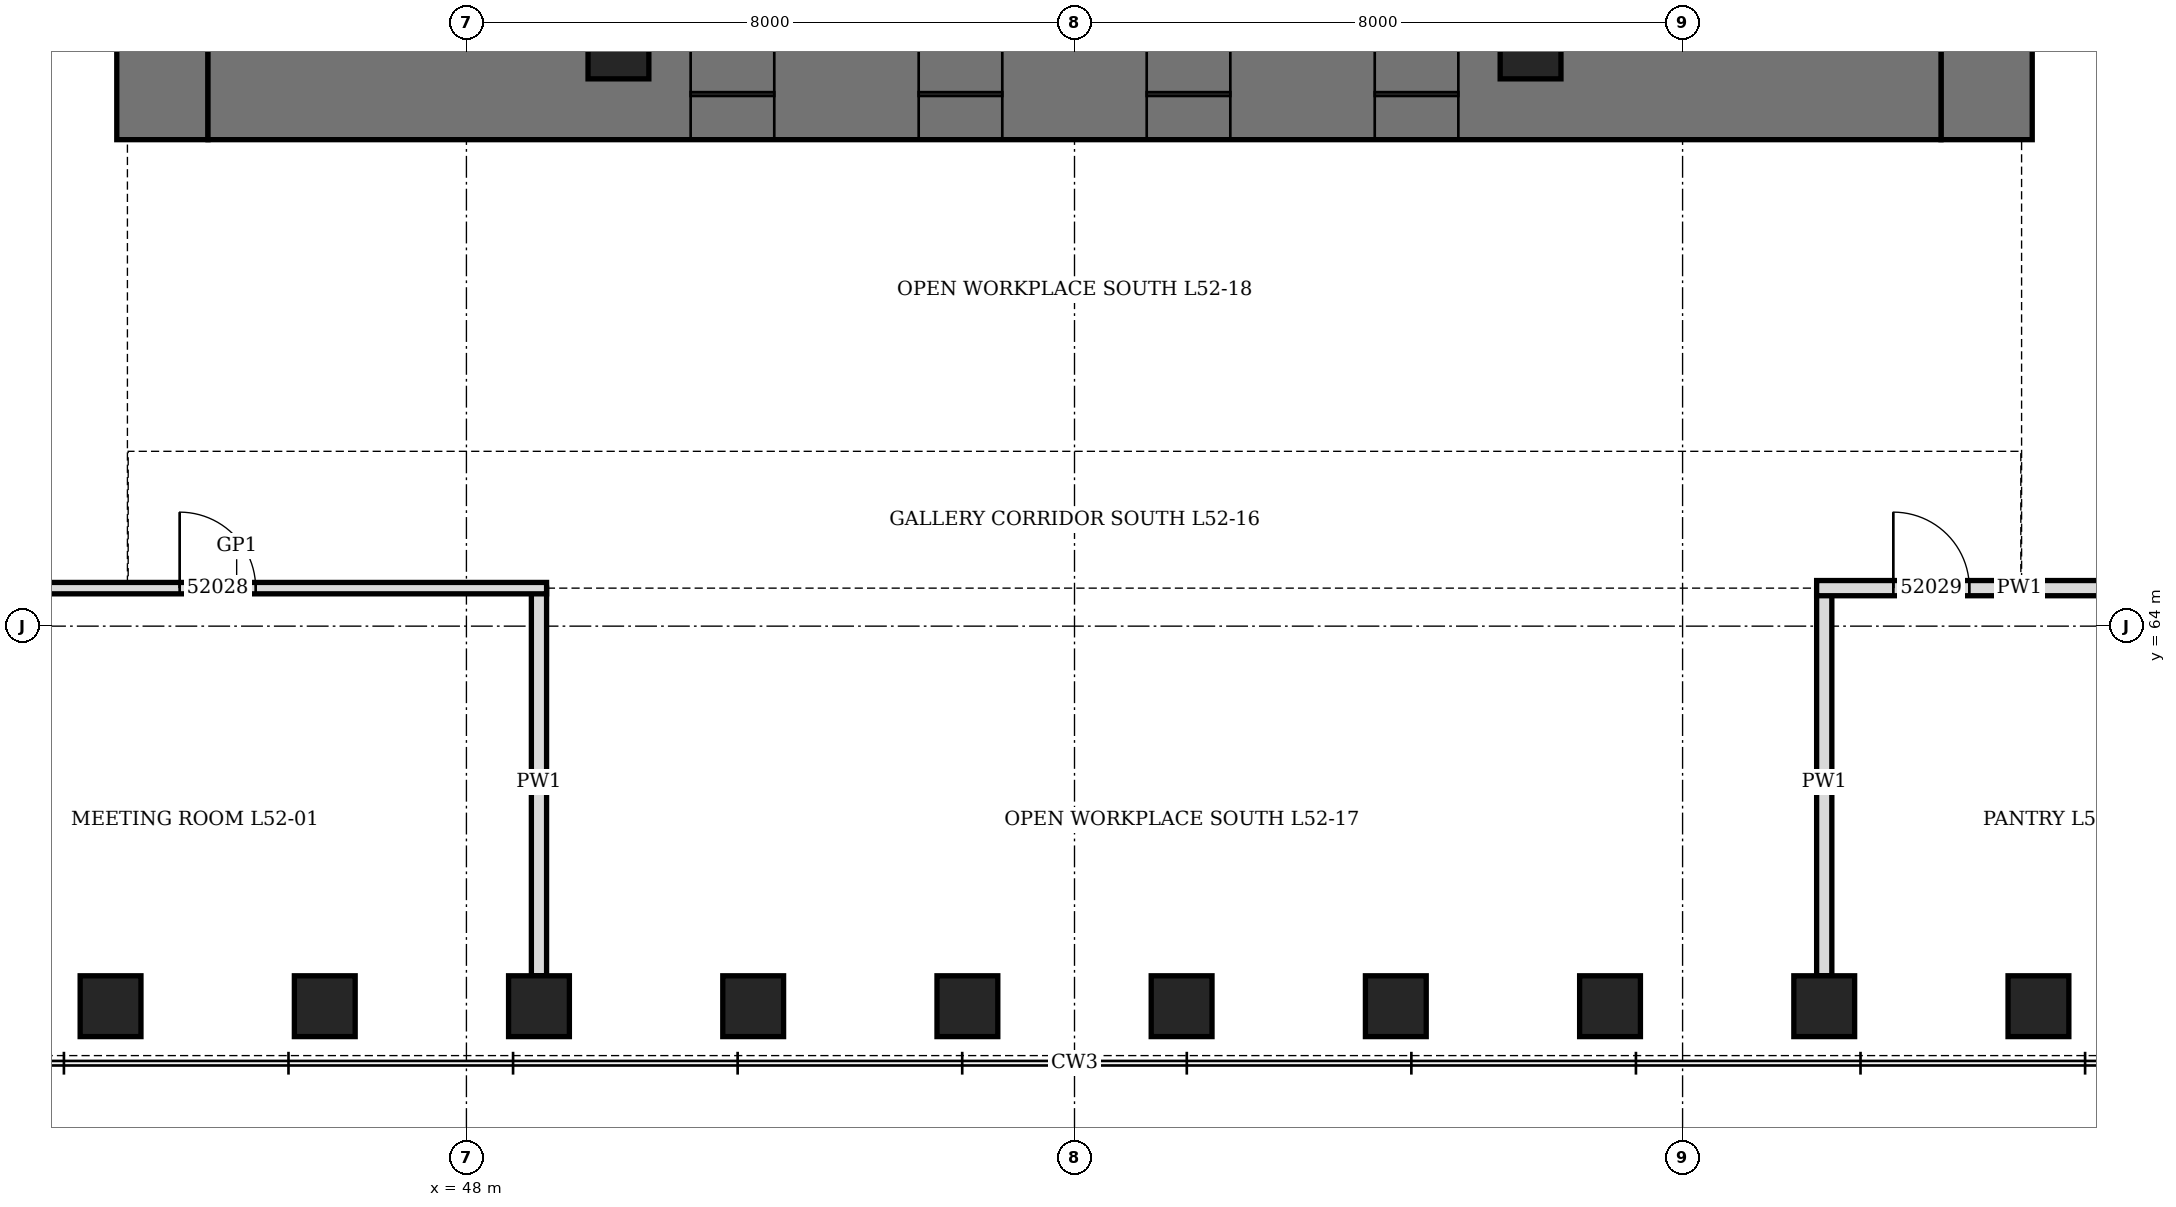
"""IFC4 building model, lengths in metres.
Left out: names, types, materials, properties, quantities, classifications, styles, units other than length and angle.
Written with IfcOpenShell. Run it as: python <this file> out.ifc"""

import sys

from ifc_helpers import new_model, si_unit, direction, frame, frame_2d, origin, origin_2d, place, context, subcontext, project, spatial, rectangle, hollow_rectangle, extrude, element, fill, save


model = new_model("IFC4")
c1 = context("Model", 3, precision=1e-05, world=origin(), true_north=direction((0.0, 1.0)))
c2 = subcontext(c1, "Body", "Model", "MODEL_VIEW")
j1 = project(units=[si_unit("LENGTHUNIT", "METRE"), si_unit("PLANEANGLEUNIT", "RADIAN")], contexts=[c1])
p1 = place(None, origin())
s1 = spatial("IfcSite", under=j1, at=p1, CompositionType="ELEMENT")
p2 = place(p1, origin())
s2 = spatial("IfcBuilding", under=s1, at=p2, CompositionType="ELEMENT")
p3 = place(p2, frame((0.0, 0.0, 231.7)))
s3 = spatial("IfcBuildingStorey", under=s2, at=p3, CompositionType="ELEMENT", Elevation=231.7)
for number, where, z_axis, x_axis in (
    (1, (43.318, 59.0, 0.0), (0.0, 0.0, 1.0), (1.0, 0.0, 0.0)),
    (2, (46.136, 59.0, 0.0), (0.0, 0.0, 1.0), (1.0, 0.0, 0.0)),
    (3, (48.955, 59.0, 0.0), (0.0, 0.0, 1.0), (1.0, 0.0, 0.0)),
    (4, (51.773, 59.0, 0.0), (0.0, 0.0, 1.0), (1.0, 0.0, 0.0)),
    (5, (54.591, 59.0, 0.0), (0.0, 0.0, 1.0), (1.0, 0.0, 0.0)),
    (6, (57.409, 59.0, 0.0), (0.0, 0.0, 1.0), (1.0, 0.0, 0.0)),
    (7, (60.227, 59.0, 0.0), (0.0, 0.0, 1.0), (1.0, 0.0, 0.0)),
    (8, (63.045, 59.0, 0.0), (0.0, 0.0, 1.0), (1.0, 0.0, 0.0)),
    (9, (65.864, 59.0, 0.0), (0.0, 0.0, 1.0), (1.0, 0.0, 0.0)),
    (10, (68.682, 59.0, 0.0), (0.0, 0.0, 1.0), (1.0, 0.0, 0.0)),
):
    element("IfcColumn", number, at=place(p3, frame(where, z_axis=z_axis, x_axis=x_axis)), inside=s3, PredefinedType="COLUMN", context=c2, shape_type="SweptSolid", body=[
        extrude(hollow_rectangle(XDim=0.8, YDim=0.8, WallThickness=0.08, at=origin_2d()), origin(), (0.0, 0.0, 1.0), 4.2),
    ])
p4 = place(p3, frame((44.0, 70.4, 0.0), z_axis=(0.0, 0.0, 1.0), x_axis=(0.0, 1.0, 0.0)))
e11 = element("IfcWall", 11, at=p4, inside=s3, PredefinedType="SHEAR", context=c2, shape_type="SweptSolid", body=[
    extrude(rectangle(XDim=19.2, YDim=1.2, at=frame_2d((9.6, 0.0))), origin(), (0.0, 0.0, 1.0), 4.2),
])
p5 = place(p4, frame((8.6, 0.0, 0.0)))
e12 = element("IfcOpeningElement", 12, at=p5, cuts=e11, PredefinedType="OPENING", context=c2, shape_type="SweptSolid", body=[
    extrude(rectangle(XDim=2.0, YDim=2.4, at=frame_2d((1.0, 1.2))), frame((0.0, 0.61, 0.0), z_axis=(0.0, -1.0, 0.0), x_axis=(1.0, 0.0, 0.0)), (0.0, 0.0, 1.0), 1.22),
])
p6 = place(p3, frame((68.0, 70.4, 0.0), z_axis=(0.0, 0.0, 1.0), x_axis=(0.0, 1.0, 0.0)))
e13 = element("IfcWall", 13, at=p6, inside=s3, PredefinedType="SHEAR", context=c2, shape_type="SweptSolid", body=[
    extrude(rectangle(XDim=19.2, YDim=1.2, at=frame_2d((9.6, 0.0))), origin(), (0.0, 0.0, 1.0), 4.2),
])
p7 = place(p6, frame((8.6, 0.0, 0.0)))
e14 = element("IfcOpeningElement", 14, at=p7, cuts=e13, PredefinedType="OPENING", context=c2, shape_type="SweptSolid", body=[
    extrude(rectangle(XDim=2.0, YDim=2.4, at=frame_2d((1.0, 1.2))), frame((0.0, 0.61, 0.0), z_axis=(0.0, -1.0, 0.0), x_axis=(1.0, 0.0, 0.0)), (0.0, 0.0, 1.0), 1.22),
])
p8 = place(p3, frame((44.6, 71.0, 0.0), z_axis=(0.0, 0.0, 1.0), x_axis=(1.0, 0.0, 0.0)))
e15 = element("IfcWall", 15, at=p8, inside=s3, PredefinedType="SHEAR", context=c2, shape_type="SweptSolid", body=[
    extrude(rectangle(XDim=22.8, YDim=1.2, at=frame_2d((11.4, 0.0))), origin(), (0.0, 0.0, 1.0), 4.2),
])
p9 = place(p8, frame((6.35, 0.0, 0.0)))
e16 = element("IfcOpeningElement", 16, at=p9, cuts=e15, PredefinedType="OPENING", context=c2, shape_type="SweptSolid", body=[
    extrude(rectangle(XDim=1.1, YDim=2.2, at=frame_2d((0.55, 1.1))), frame((0.0, 0.61, 0.0), z_axis=(0.0, -1.0, 0.0), x_axis=(1.0, 0.0, 0.0)), (0.0, 0.0, 1.0), 1.22),
])
p10 = place(p8, frame((9.35, 0.0, 0.0)))
e17 = element("IfcOpeningElement", 17, at=p10, cuts=e15, PredefinedType="OPENING", context=c2, shape_type="SweptSolid", body=[
    extrude(rectangle(XDim=1.1, YDim=2.2, at=frame_2d((0.55, 1.1))), frame((0.0, 0.61, 0.0), z_axis=(0.0, -1.0, 0.0), x_axis=(1.0, 0.0, 0.0)), (0.0, 0.0, 1.0), 1.22),
])
p11 = place(p8, frame((12.35, 0.0, 0.0)))
e18 = element("IfcOpeningElement", 18, at=p11, cuts=e15, PredefinedType="OPENING", context=c2, shape_type="SweptSolid", body=[
    extrude(rectangle(XDim=1.1, YDim=2.2, at=frame_2d((0.55, 1.1))), frame((0.0, 0.61, 0.0), z_axis=(0.0, -1.0, 0.0), x_axis=(1.0, 0.0, 0.0)), (0.0, 0.0, 1.0), 1.22),
])
p12 = place(p8, frame((15.35, 0.0, 0.0)))
e19 = element("IfcOpeningElement", 19, at=p12, cuts=e15, PredefinedType="OPENING", context=c2, shape_type="SweptSolid", body=[
    extrude(rectangle(XDim=1.1, YDim=2.2, at=frame_2d((0.55, 1.1))), frame((0.0, 0.61, 0.0), z_axis=(0.0, -1.0, 0.0), x_axis=(1.0, 0.0, 0.0)), (0.0, 0.0, 1.0), 1.22),
])
for number, where, z_axis, x_axis in (
    (20, (50.0, 71.6, 0.0), (0.0, 0.0, 1.0), (1.0, 0.0, 0.0)),
    (21, (62.0, 71.6, 0.0), (0.0, 0.0, 1.0), (1.0, 0.0, 0.0)),
):
    element("IfcColumn", number, at=place(p3, frame(where, z_axis=z_axis, x_axis=x_axis)), inside=s3, PredefinedType="COLUMN", context=c2, shape_type="SweptSolid", body=[
        extrude(hollow_rectangle(XDim=0.8, YDim=0.8, WallThickness=0.1, at=origin_2d()), origin(), (0.0, 0.0, 1.0), 4.2),
    ])
for number, where, z_axis, x_axis in (
    (22, (48.955, 59.4, 0.0), (0.0, 0.0, 1.0), (0.0, 1.0, 0.0)),
    (23, (65.864, 59.4, 0.0), (0.0, 0.0, 1.0), (0.0, 1.0, 0.0)),
):
    element("IfcWall", number, at=place(p3, frame(where, z_axis=z_axis, x_axis=x_axis)), inside=s3, PredefinedType="PARTITIONING", context=c2, shape_type="SweptSolid", body=[
        extrude(rectangle(XDim=5.1, YDim=0.2, at=frame_2d((2.55, 0.0))), origin(), (0.0, 0.0, 1.0), 3.428),
    ])
p13 = place(p3, frame((40.9, 64.5, 0.0), z_axis=(0.0, 0.0, 1.0), x_axis=(1.0, 0.0, 0.0)))
e24 = element("IfcWall", 24, at=p13, inside=s3, PredefinedType="PARTITIONING", context=c2, shape_type="SweptSolid", body=[
    extrude(rectangle(XDim=8.155, YDim=0.15, at=frame_2d((4.077, 0.0))), origin(), (0.0, 0.0, 1.0), 4.04),
])
p14 = place(p13, frame((3.327, 0.0, 0.0)))
e25 = element("IfcOpeningElement", 25, at=p14, cuts=e24, PredefinedType="OPENING", context=c2, shape_type="SweptSolid", body=[
    extrude(rectangle(XDim=1.0, YDim=2.4, at=frame_2d((0.5, 1.2))), frame((0.0, 0.085, 0.0), z_axis=(0.0, -1.0, 0.0), x_axis=(1.0, 0.0, 0.0)), (0.0, 0.0, 1.0), 0.17),
])
p15 = place(p3, frame((65.764, 64.5, 0.0), z_axis=(0.0, 0.0, 1.0), x_axis=(1.0, 0.0, 0.0)))
e26 = element("IfcWall", 26, at=p15, inside=s3, PredefinedType="PARTITIONING", context=c2, shape_type="SweptSolid", body=[
    extrude(rectangle(XDim=5.336, YDim=0.2, at=frame_2d((2.668, 0.0))), origin(), (0.0, 0.0, 1.0), 4.04),
])
p16 = place(p15, frame((1.009, 0.0, 0.0)))
e27 = element("IfcOpeningElement", 27, at=p16, cuts=e26, PredefinedType="OPENING", context=c2, shape_type="SweptSolid", body=[
    extrude(rectangle(XDim=1.0, YDim=2.1, at=frame_2d((0.5, 1.05))), frame((0.0, 0.11, 0.0), z_axis=(0.0, -1.0, 0.0), x_axis=(1.0, 0.0, 0.0)), (0.0, 0.0, 1.0), 0.22),
])
p17 = place(p9, origin())
e28 = element("IfcDoor", 28, at=p17, inside=s3, OperationType="SLIDING_TO_LEFT", PredefinedType="DOOR", context=c2, shape_type="SweptSolid", body=[
    extrude(rectangle(XDim=1.1, YDim=2.2, at=frame_2d((0.55, 1.1))), frame((0.0, 0.35, 0.0), z_axis=(0.0, -1.0, 0.0), x_axis=(1.0, 0.0, 0.0)), (0.0, 0.0, 1.0), 0.7),
])
fill(e16, e28)
p18 = place(p10, origin())
e29 = element("IfcDoor", 29, at=p18, inside=s3, OperationType="SLIDING_TO_LEFT", PredefinedType="DOOR", context=c2, shape_type="SweptSolid", body=[
    extrude(rectangle(XDim=1.1, YDim=2.2, at=frame_2d((0.55, 1.1))), frame((0.0, 0.35, 0.0), z_axis=(0.0, -1.0, 0.0), x_axis=(1.0, 0.0, 0.0)), (0.0, 0.0, 1.0), 0.7),
])
fill(e17, e29)
p19 = place(p11, origin())
e30 = element("IfcDoor", 30, at=p19, inside=s3, OperationType="SLIDING_TO_LEFT", PredefinedType="DOOR", context=c2, shape_type="SweptSolid", body=[
    extrude(rectangle(XDim=1.1, YDim=2.2, at=frame_2d((0.55, 1.1))), frame((0.0, 0.35, 0.0), z_axis=(0.0, -1.0, 0.0), x_axis=(1.0, 0.0, 0.0)), (0.0, 0.0, 1.0), 0.7),
])
fill(e18, e30)
p20 = place(p12, origin())
e31 = element("IfcDoor", 31, at=p20, inside=s3, OperationType="SLIDING_TO_LEFT", PredefinedType="DOOR", context=c2, shape_type="SweptSolid", body=[
    extrude(rectangle(XDim=1.1, YDim=2.2, at=frame_2d((0.55, 1.1))), frame((0.0, 0.35, 0.0), z_axis=(0.0, -1.0, 0.0), x_axis=(1.0, 0.0, 0.0)), (0.0, 0.0, 1.0), 0.7),
])
fill(e19, e31)
p21 = place(p14, origin())
e32 = element("IfcDoor", 32, at=p21, inside=s3, OperationType="SINGLE_SWING_RIGHT", PredefinedType="DOOR", context=c2, shape_type="SweptSolid", body=[
    extrude(rectangle(XDim=1.0, YDim=2.4, at=frame_2d((0.5, 1.2))), frame((0.0, 0.075, 0.0), z_axis=(0.0, -1.0, 0.0), x_axis=(1.0, 0.0, 0.0)), (0.0, 0.0, 1.0), 0.149),
])
fill(e25, e32)
p22 = place(p16, origin())
e33 = element("IfcDoor", 33, at=p22, inside=s3, OperationType="SINGLE_SWING_LEFT", PredefinedType="DOOR", context=c2, shape_type="SweptSolid", body=[
    extrude(rectangle(XDim=1.0, YDim=2.1, at=frame_2d((0.5, 1.05))), frame((0.0, 0.1, 0.0), z_axis=(0.0, -1.0, 0.0), x_axis=(1.0, 0.0, 0.0)), (0.0, 0.0, 1.0), 0.199),
])
fill(e27, e33)
save(model, sys.argv[1])
